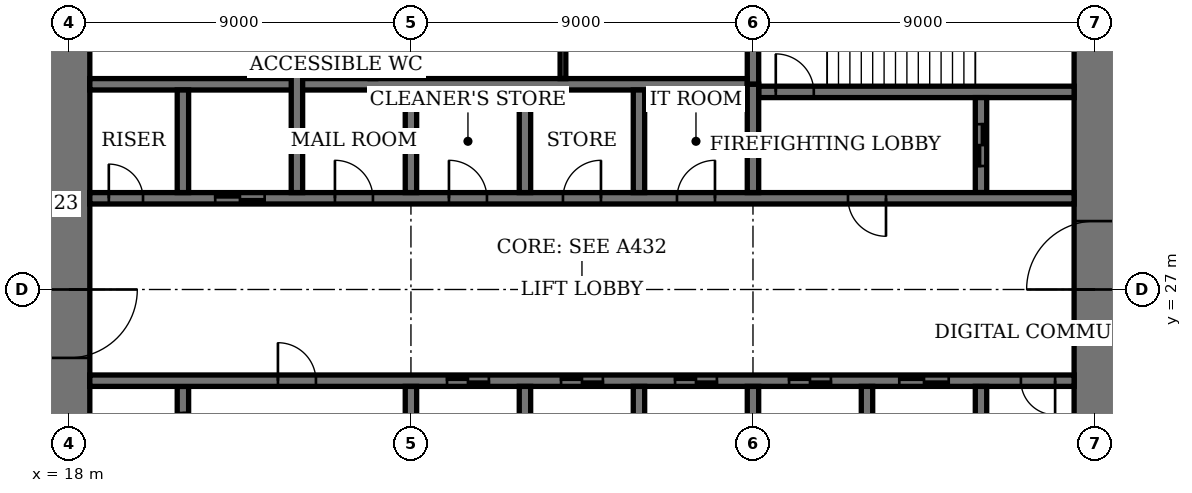
"""IFC4 building model, lengths in metres.
Left out: names, types, materials, properties, quantities, classifications, styles, units other than length and angle.
Written with IfcOpenShell. Run it as: python <this file> out.ifc"""

import sys

from ifc_helpers import new_model, si_unit, direction, frame, frame_2d, origin, place, context, subcontext, project, spatial, rectangle, extrude, element, fill, save


model = new_model("IFC4")
c1 = context("Model", 3, precision=1e-05, world=origin(), true_north=direction((0.0, 1.0)))
c2 = subcontext(c1, "Body", "Model", "MODEL_VIEW")
j1 = project(units=[si_unit("LENGTHUNIT", "METRE"), si_unit("PLANEANGLEUNIT", "RADIAN")], contexts=[c1])
p1 = place(None, origin())
s1 = spatial("IfcSite", under=j1, at=p1, CompositionType="ELEMENT")
p2 = place(p1, origin())
s2 = spatial("IfcBuilding", under=s1, at=p2, CompositionType="ELEMENT")
p3 = place(p2, frame((0.0, 0.0, 271.4)))
s3 = spatial("IfcBuildingStorey", under=s2, at=p3, CompositionType="ELEMENT", Elevation=271.4)
p4 = place(p3, frame((18.0, 35.45, 0.0), z_axis=(0.0, 0.0, 1.0), x_axis=(0.0, -1.0, 0.0)))
e1 = element("IfcWall", 1, at=p4, inside=s3, PredefinedType="SHEAR", context=c2, shape_type="SweptSolid", body=[
    extrude(rectangle(XDim=16.9, YDim=1.1, at=frame_2d((8.45, 0.0))), origin(), (0.0, 0.0, 1.0), 4.0),
])
p5 = place(p4, frame((8.45, 0.0, 0.0)))
e2 = element("IfcOpeningElement", 2, at=p5, cuts=e1, PredefinedType="OPENING", context=c2, shape_type="SweptSolid", body=[
    extrude(rectangle(XDim=1.8, YDim=2.4, at=frame_2d((0.9, 1.2))), frame((0.0, 0.56, 0.0), z_axis=(0.0, -1.0, 0.0), x_axis=(1.0, 0.0, 0.0)), (0.0, 0.0, 1.0), 1.12),
])
p6 = place(p3, frame((45.0, 18.55, 0.0), z_axis=(0.0, 0.0, 1.0), x_axis=(0.0, 1.0, 0.0)))
e3 = element("IfcWall", 3, at=p6, inside=s3, PredefinedType="SHEAR", context=c2, shape_type="SweptSolid", body=[
    extrude(rectangle(XDim=16.9, YDim=1.1, at=frame_2d((8.45, 0.0))), origin(), (0.0, 0.0, 1.0), 4.0),
])
p7 = place(p6, frame((8.45, 0.0, 0.0)))
e4 = element("IfcOpeningElement", 4, at=p7, cuts=e3, PredefinedType="OPENING", context=c2, shape_type="SweptSolid", body=[
    extrude(rectangle(XDim=1.8, YDim=2.4, at=frame_2d((0.9, 1.2))), frame((0.0, 0.56, 0.0), z_axis=(0.0, -1.0, 0.0), x_axis=(1.0, 0.0, 0.0)), (0.0, 0.0, 1.0), 1.12),
])
p8 = place(p3, frame((36.15, 32.2, 0.0), z_axis=(0.0, 0.0, 1.0), x_axis=(1.0, 0.0, 0.0)))
e5 = element("IfcWall", 5, at=p8, inside=s3, PredefinedType="SHEAR", context=c2, shape_type="SweptSolid", body=[
    extrude(rectangle(XDim=8.3, YDim=0.3, at=frame_2d((4.15, 0.0))), origin(), (0.0, 0.0, 1.0), 4.0),
])
p9 = place(p8, frame((0.45, 0.0, 0.0)))
e6 = element("IfcOpeningElement", 6, at=p9, cuts=e5, PredefinedType="OPENING", context=c2, shape_type="SweptSolid", body=[
    extrude(rectangle(XDim=1.0, YDim=2.4, at=frame_2d((0.5, 1.2))), frame((0.0, 0.16, 0.0), z_axis=(0.0, -1.0, 0.0), x_axis=(1.0, 0.0, 0.0)), (0.0, 0.0, 1.0), 0.32),
])
p10 = place(p3, frame((36.0, 32.4, 0.0), z_axis=(0.0, 0.0, 1.0), x_axis=(0.0, 1.0, 0.0)))
e7 = element("IfcWall", 7, at=p10, inside=s3, PredefinedType="SHEAR", context=c2, shape_type="SweptSolid", body=[
    extrude(rectangle(XDim=3.05, YDim=0.3, at=frame_2d((1.525, 0.0))), origin(), (0.0, 0.0, 1.0), 4.0),
])
p11 = place(p3, frame((21.0, 21.95, 0.0), z_axis=(0.0, 0.0, 1.0), x_axis=(0.0, 1.0, 0.0)))
e8 = element("IfcWall", 8, at=p11, inside=s3, PredefinedType="SHEAR", context=c2, shape_type="SweptSolid", body=[
    extrude(rectangle(XDim=2.5, YDim=0.3, at=frame_2d((1.25, 0.0))), origin(), (0.0, 0.0, 1.0), 4.0),
])
p12 = place(p11, frame((0.7, 0.0, 0.0)))
e9 = element("IfcOpeningElement", 9, at=p12, cuts=e8, PredefinedType="OPENING", context=c2, shape_type="SweptSolid", body=[
    extrude(rectangle(XDim=1.1, YDim=2.4, at=frame_2d((0.55, 1.2))), frame((0.0, 0.16, 0.0), z_axis=(0.0, -1.0, 0.0), x_axis=(1.0, 0.0, 0.0)), (0.0, 0.0, 1.0), 0.32),
])
p13 = place(p3, frame((42.0, 29.55, 0.0), z_axis=(0.0, 0.0, 1.0), x_axis=(0.0, 1.0, 0.0)))
e10 = element("IfcWall", 10, at=p13, inside=s3, PredefinedType="SHEAR", context=c2, shape_type="SweptSolid", body=[
    extrude(rectangle(XDim=2.5, YDim=0.3, at=frame_2d((1.25, 0.0))), origin(), (0.0, 0.0, 1.0), 4.0),
])
p14 = place(p13, frame((0.7, 0.0, 0.0)))
e11 = element("IfcOpeningElement", 11, at=p14, cuts=e10, PredefinedType="OPENING", context=c2, shape_type="SweptSolid", body=[
    extrude(rectangle(XDim=1.1, YDim=2.4, at=frame_2d((0.55, 1.2))), frame((0.0, 0.16, 0.0), z_axis=(0.0, -1.0, 0.0), x_axis=(1.0, 0.0, 0.0)), (0.0, 0.0, 1.0), 0.32),
])
p15 = place(p3, frame((18.55, 24.6, 0.0), z_axis=(0.0, 0.0, 1.0), x_axis=(1.0, 0.0, 0.0)))
e12 = element("IfcWall", 12, at=p15, inside=s3, PredefinedType="SHEAR", context=c2, shape_type="SweptSolid", body=[
    extrude(rectangle(XDim=25.9, YDim=0.3, at=frame_2d((12.95, 0.0))), origin(), (0.0, 0.0, 1.0), 4.0),
])
p16 = place(p15, frame((4.95, 0.0, 0.0)))
e13 = element("IfcOpeningElement", 13, at=p16, cuts=e12, PredefinedType="OPENING", context=c2, shape_type="SweptSolid", body=[
    extrude(rectangle(XDim=1.0, YDim=2.4, at=frame_2d((0.5, 1.2))), frame((0.0, 0.16, 0.0), z_axis=(0.0, -1.0, 0.0), x_axis=(1.0, 0.0, 0.0)), (0.0, 0.0, 1.0), 0.32),
])
p17 = place(p15, frame((24.5, 0.0, 0.0)))
e14 = element("IfcOpeningElement", 14, at=p17, cuts=e12, PredefinedType="OPENING", context=c2, shape_type="SweptSolid", body=[
    extrude(rectangle(XDim=0.9, YDim=2.1, at=frame_2d((0.45, 1.05))), frame((0.0, 0.16, 0.0), z_axis=(0.0, -1.0, 0.0), x_axis=(1.0, 0.0, 0.0)), (0.0, 0.0, 1.0), 0.32),
])
p18 = place(p15, frame((9.4, 0.0, 0.0)))
e15 = element("IfcOpeningElement", 15, at=p18, cuts=e12, PredefinedType="OPENING", context=c2, shape_type="SweptSolid", body=[
    extrude(rectangle(XDim=1.1, YDim=2.4, at=frame_2d((0.55, 1.2))), frame((0.0, 0.16, 0.0), z_axis=(0.0, -1.0, 0.0), x_axis=(1.0, 0.0, 0.0)), (0.0, 0.0, 1.0), 0.32),
])
p19 = place(p15, frame((12.4, 0.0, 0.0)))
e16 = element("IfcOpeningElement", 16, at=p19, cuts=e12, PredefinedType="OPENING", context=c2, shape_type="SweptSolid", body=[
    extrude(rectangle(XDim=1.1, YDim=2.4, at=frame_2d((0.55, 1.2))), frame((0.0, 0.16, 0.0), z_axis=(0.0, -1.0, 0.0), x_axis=(1.0, 0.0, 0.0)), (0.0, 0.0, 1.0), 0.32),
])
p20 = place(p15, frame((15.4, 0.0, 0.0)))
e17 = element("IfcOpeningElement", 17, at=p20, cuts=e12, PredefinedType="OPENING", context=c2, shape_type="SweptSolid", body=[
    extrude(rectangle(XDim=1.1, YDim=2.4, at=frame_2d((0.55, 1.2))), frame((0.0, 0.16, 0.0), z_axis=(0.0, -1.0, 0.0), x_axis=(1.0, 0.0, 0.0)), (0.0, 0.0, 1.0), 0.32),
])
p21 = place(p15, frame((18.4, 0.0, 0.0)))
e18 = element("IfcOpeningElement", 18, at=p21, cuts=e12, PredefinedType="OPENING", context=c2, shape_type="SweptSolid", body=[
    extrude(rectangle(XDim=1.1, YDim=2.4, at=frame_2d((0.55, 1.2))), frame((0.0, 0.16, 0.0), z_axis=(0.0, -1.0, 0.0), x_axis=(1.0, 0.0, 0.0)), (0.0, 0.0, 1.0), 0.32),
])
p22 = place(p15, frame((21.3, 0.0, 0.0)))
e19 = element("IfcOpeningElement", 19, at=p22, cuts=e12, PredefinedType="OPENING", context=c2, shape_type="SweptSolid", body=[
    extrude(rectangle(XDim=1.3, YDim=2.4, at=frame_2d((0.65, 1.2))), frame((0.0, 0.16, 0.0), z_axis=(0.0, -1.0, 0.0), x_axis=(1.0, 0.0, 0.0)), (0.0, 0.0, 1.0), 0.32),
])
p23 = place(p3, frame((18.55, 29.4, 0.0), z_axis=(0.0, 0.0, 1.0), x_axis=(1.0, 0.0, 0.0)))
e20 = element("IfcWall", 20, at=p23, inside=s3, PredefinedType="SHEAR", context=c2, shape_type="SweptSolid", body=[
    extrude(rectangle(XDim=25.9, YDim=0.3, at=frame_2d((12.95, 0.0))), origin(), (0.0, 0.0, 1.0), 4.0),
])
p24 = place(p23, frame((19.95, 0.0, 0.0)))
e21 = element("IfcOpeningElement", 21, at=p24, cuts=e20, PredefinedType="OPENING", context=c2, shape_type="SweptSolid", body=[
    extrude(rectangle(XDim=1.0, YDim=2.4, at=frame_2d((0.5, 1.2))), frame((0.0, 0.16, 0.0), z_axis=(0.0, -1.0, 0.0), x_axis=(1.0, 0.0, 0.0)), (0.0, 0.0, 1.0), 0.32),
])
p25 = place(p23, frame((0.5, 0.0, 0.0)))
e22 = element("IfcOpeningElement", 22, at=p25, cuts=e20, PredefinedType="OPENING", context=c2, shape_type="SweptSolid", body=[
    extrude(rectangle(XDim=0.9, YDim=2.1, at=frame_2d((0.45, 1.05))), frame((0.0, 0.16, 0.0), z_axis=(0.0, -1.0, 0.0), x_axis=(1.0, 0.0, 0.0)), (0.0, 0.0, 1.0), 0.32),
])
p26 = place(p23, frame((15.45, 0.0, 0.0)))
e23 = element("IfcOpeningElement", 23, at=p26, cuts=e20, PredefinedType="OPENING", context=c2, shape_type="SweptSolid", body=[
    extrude(rectangle(XDim=1.0, YDim=2.4, at=frame_2d((0.5, 1.2))), frame((0.0, 0.16, 0.0), z_axis=(0.0, -1.0, 0.0), x_axis=(1.0, 0.0, 0.0)), (0.0, 0.0, 1.0), 0.32),
])
p27 = place(p23, frame((12.45, 0.0, 0.0)))
e24 = element("IfcOpeningElement", 24, at=p27, cuts=e20, PredefinedType="OPENING", context=c2, shape_type="SweptSolid", body=[
    extrude(rectangle(XDim=1.0, YDim=2.4, at=frame_2d((0.5, 1.2))), frame((0.0, 0.16, 0.0), z_axis=(0.0, -1.0, 0.0), x_axis=(1.0, 0.0, 0.0)), (0.0, 0.0, 1.0), 0.32),
])
p28 = place(p23, frame((9.45, 0.0, 0.0)))
e25 = element("IfcOpeningElement", 25, at=p28, cuts=e20, PredefinedType="OPENING", context=c2, shape_type="SweptSolid", body=[
    extrude(rectangle(XDim=1.0, YDim=2.4, at=frame_2d((0.5, 1.2))), frame((0.0, 0.16, 0.0), z_axis=(0.0, -1.0, 0.0), x_axis=(1.0, 0.0, 0.0)), (0.0, 0.0, 1.0), 0.32),
])
p29 = place(p23, frame((6.45, 0.0, 0.0)))
e26 = element("IfcOpeningElement", 26, at=p29, cuts=e20, PredefinedType="OPENING", context=c2, shape_type="SweptSolid", body=[
    extrude(rectangle(XDim=1.0, YDim=2.4, at=frame_2d((0.5, 1.2))), frame((0.0, 0.16, 0.0), z_axis=(0.0, -1.0, 0.0), x_axis=(1.0, 0.0, 0.0)), (0.0, 0.0, 1.0), 0.32),
])
p30 = place(p23, frame((3.3, 0.0, 0.0)))
e27 = element("IfcOpeningElement", 27, at=p30, cuts=e20, PredefinedType="OPENING", context=c2, shape_type="SweptSolid", body=[
    extrude(rectangle(XDim=1.3, YDim=2.4, at=frame_2d((0.65, 1.2))), frame((0.0, 0.16, 0.0), z_axis=(0.0, -1.0, 0.0), x_axis=(1.0, 0.0, 0.0)), (0.0, 0.0, 1.0), 0.32),
])
p31 = place(p3, frame((18.55, 32.4, 0.0), z_axis=(0.0, 0.0, 1.0), x_axis=(1.0, 0.0, 0.0)))
e28 = element("IfcWall", 28, at=p31, inside=s3, PredefinedType="SHEAR", context=c2, shape_type="SweptSolid", body=[
    extrude(rectangle(XDim=17.3, YDim=0.3, at=frame_2d((8.65, 0.0))), origin(), (0.0, 0.0, 1.0), 4.0),
])
for number, where, z_axis, x_axis in (
    (29, (30.0, 21.75, 0.0), (0.0, 0.0, 1.0), (0.0, 1.0, 0.0)),
    (30, (33.0, 29.55, 0.0), (0.0, 0.0, 1.0), (0.0, 1.0, 0.0)),
    (31, (33.0, 21.75, 0.0), (0.0, 0.0, 1.0), (0.0, 1.0, 0.0)),
    (32, (30.0, 29.55, 0.0), (0.0, 0.0, 1.0), (0.0, 1.0, 0.0)),
    (33, (36.0, 21.75, 0.0), (0.0, 0.0, 1.0), (0.0, 1.0, 0.0)),
    (34, (27.0, 29.55, 0.0), (0.0, 0.0, 1.0), (0.0, 1.0, 0.0)),
):
    element("IfcWall", number, at=place(p3, frame(where, z_axis=z_axis, x_axis=x_axis)), inside=s3, PredefinedType="SHEAR", context=c2, shape_type="SweptSolid", body=[
        extrude(rectangle(XDim=2.7, YDim=0.3, at=frame_2d((1.35, 0.0))), origin(), (0.0, 0.0, 1.0), 4.0),
    ])
for number, where, z_axis, x_axis in (
    (35, (39.0, 18.55, 0.0), (0.0, 0.0, 1.0), (0.0, 1.0, 0.0)),
    (36, (24.0, 29.55, 0.0), (0.0, 0.0, 1.0), (0.0, 1.0, 0.0)),
):
    element("IfcWall", number, at=place(p3, frame(where, z_axis=z_axis, x_axis=x_axis)), inside=s3, PredefinedType="SHEAR", context=c2, shape_type="SweptSolid", body=[
        extrude(rectangle(XDim=5.9, YDim=0.3, at=frame_2d((2.95, 0.0))), origin(), (0.0, 0.0, 1.0), 4.0),
    ])
for number, where, z_axis, x_axis in (
    (37, (42.0, 21.75, 0.0), (0.0, 0.0, 1.0), (0.0, 1.0, 0.0)),
    (38, (21.0, 29.55, 0.0), (0.0, 0.0, 1.0), (0.0, 1.0, 0.0)),
):
    element("IfcWall", number, at=place(p3, frame(where, z_axis=z_axis, x_axis=x_axis)), inside=s3, PredefinedType="SHEAR", context=c2, shape_type="SweptSolid", body=[
        extrude(rectangle(XDim=2.7, YDim=0.3, at=frame_2d((1.35, 0.0))), origin(), (0.0, 0.0, 1.0), 4.0),
    ])
for number, where, z_axis, x_axis in (
    (39, (27.0, 21.6, 0.0), (0.0, 0.0, 1.0), (0.0, 1.0, 0.0)),
    (40, (36.0, 29.55, 0.0), (0.0, 0.0, 1.0), (0.0, 1.0, 0.0)),
):
    element("IfcWall", number, at=place(p3, frame(where, z_axis=z_axis, x_axis=x_axis)), inside=s3, PredefinedType="SHEAR", context=c2, shape_type="SweptSolid", body=[
        extrude(rectangle(XDim=2.85, YDim=0.3, at=frame_2d((1.425, 0.0))), origin(), (0.0, 0.0, 1.0), 4.0),
    ])
for number, where, z_axis, x_axis in (
    (41, (31.0, 32.55, 0.0), (0.0, 0.0, 1.0), (0.0, 1.0, 0.0)),
    (42, (26.0, 32.55, 0.0), (0.0, 0.0, 1.0), (0.0, 1.0, 0.0)),
):
    element("IfcWall", number, at=place(p3, frame(where, z_axis=z_axis, x_axis=x_axis)), inside=s3, PredefinedType="PARTITIONING", context=c2, shape_type="SweptSolid", body=[
        extrude(rectangle(XDim=2.9, YDim=0.15, at=frame_2d((1.45, 0.0))), origin(), (0.0, 0.0, 1.0), 3.75),
    ])
p32 = place(p5, origin())
e43 = element("IfcDoor", 43, at=p32, inside=s3, OperationType="DOUBLE_DOOR_DOUBLE_SWING", PredefinedType="DOOR", context=c2, shape_type="SweptSolid", body=[
    extrude(rectangle(XDim=1.8, YDim=2.4, at=frame_2d((0.9, 1.2))), frame((0.0, 0.03, 0.0), z_axis=(0.0, -1.0, 0.0), x_axis=(1.0, 0.0, 0.0)), (0.0, 0.0, 1.0), 0.06),
    extrude(rectangle(XDim=0.04, YDim=2.4, at=frame_2d((0.02, 1.2))), frame((0.0, 0.55, 0.0), z_axis=(0.0, -1.0, 0.0), x_axis=(1.0, 0.0, 0.0)), (0.0, 0.0, 1.0), 1.1),
    extrude(rectangle(XDim=0.04, YDim=2.4, at=frame_2d((1.78, 1.2))), frame((0.0, 0.55, 0.0), z_axis=(0.0, -1.0, 0.0), x_axis=(1.0, 0.0, 0.0)), (0.0, 0.0, 1.0), 1.1),
    extrude(rectangle(XDim=1.8, YDim=0.04, at=frame_2d((0.9, 2.38))), frame((0.0, 0.55, 0.0), z_axis=(0.0, -1.0, 0.0), x_axis=(1.0, 0.0, 0.0)), (0.0, 0.0, 1.0), 1.1),
])
fill(e2, e43)
p33 = place(p7, origin())
e44 = element("IfcDoor", 44, at=p33, inside=s3, OperationType="DOUBLE_DOOR_DOUBLE_SWING", PredefinedType="DOOR", context=c2, shape_type="SweptSolid", body=[
    extrude(rectangle(XDim=1.8, YDim=2.4, at=frame_2d((0.9, 1.2))), frame((0.0, 0.03, 0.0), z_axis=(0.0, -1.0, 0.0), x_axis=(1.0, 0.0, 0.0)), (0.0, 0.0, 1.0), 0.06),
    extrude(rectangle(XDim=0.04, YDim=2.4, at=frame_2d((0.02, 1.2))), frame((0.0, 0.55, 0.0), z_axis=(0.0, -1.0, 0.0), x_axis=(1.0, 0.0, 0.0)), (0.0, 0.0, 1.0), 1.1),
    extrude(rectangle(XDim=0.04, YDim=2.4, at=frame_2d((1.78, 1.2))), frame((0.0, 0.55, 0.0), z_axis=(0.0, -1.0, 0.0), x_axis=(1.0, 0.0, 0.0)), (0.0, 0.0, 1.0), 1.1),
    extrude(rectangle(XDim=1.8, YDim=0.04, at=frame_2d((0.9, 2.38))), frame((0.0, 0.55, 0.0), z_axis=(0.0, -1.0, 0.0), x_axis=(1.0, 0.0, 0.0)), (0.0, 0.0, 1.0), 1.1),
])
fill(e4, e44)
p34 = place(p9, origin())
e45 = element("IfcDoor", 45, at=p34, inside=s3, OperationType="SINGLE_SWING_RIGHT", PredefinedType="DOOR", context=c2, shape_type="SweptSolid", body=[
    extrude(rectangle(XDim=1.0, YDim=2.4, at=frame_2d((0.5, 1.2))), frame((0.0, 0.03, 0.0), z_axis=(0.0, -1.0, 0.0), x_axis=(1.0, 0.0, 0.0)), (0.0, 0.0, 1.0), 0.06),
])
fill(e6, e45)
p35 = place(p16, origin())
e46 = element("IfcDoor", 46, at=p35, inside=s3, OperationType="SINGLE_SWING_RIGHT", PredefinedType="DOOR", context=c2, shape_type="SweptSolid", body=[
    extrude(rectangle(XDim=1.0, YDim=2.4, at=frame_2d((0.5, 1.2))), frame((0.0, 0.03, 0.0), z_axis=(0.0, -1.0, 0.0), x_axis=(1.0, 0.0, 0.0)), (0.0, 0.0, 1.0), 0.06),
])
fill(e13, e46)
p36 = place(p24, origin())
e47 = element("IfcDoor", 47, at=p36, inside=s3, OperationType="SINGLE_SWING_RIGHT", PredefinedType="DOOR", context=c2, shape_type="SweptSolid", body=[
    extrude(rectangle(XDim=1.0, YDim=2.4, at=frame_2d((0.5, 1.2))), frame((0.0, 0.03, 0.0), z_axis=(0.0, -1.0, 0.0), x_axis=(1.0, 0.0, 0.0)), (0.0, 0.0, 1.0), 0.06),
])
fill(e21, e47)
p37 = place(p17, origin())
e48 = element("IfcDoor", 48, at=p37, inside=s3, OperationType="SINGLE_SWING_RIGHT", PredefinedType="DOOR", context=c2, shape_type="SweptSolid", body=[
    extrude(rectangle(XDim=0.9, YDim=2.1, at=frame_2d((0.45, 1.05))), frame((0.0, 0.03, 0.0), z_axis=(0.0, -1.0, 0.0), x_axis=(1.0, 0.0, 0.0)), (0.0, 0.0, 1.0), 0.06),
])
fill(e14, e48)
p38 = place(p25, origin())
e49 = element("IfcDoor", 49, at=p38, inside=s3, OperationType="SINGLE_SWING_RIGHT", PredefinedType="DOOR", context=c2, shape_type="SweptSolid", body=[
    extrude(rectangle(XDim=0.9, YDim=2.1, at=frame_2d((0.45, 1.05))), frame((0.0, 0.03, 0.0), z_axis=(0.0, -1.0, 0.0), x_axis=(1.0, 0.0, 0.0)), (0.0, 0.0, 1.0), 0.06),
])
fill(e22, e49)
p39 = place(p18, origin())
e50 = element("IfcDoor", 50, at=p39, inside=s3, OperationType="DOUBLE_DOOR_SLIDING", PredefinedType="DOOR", context=c2, shape_type="SweptSolid", body=[
    extrude(rectangle(XDim=1.1, YDim=2.4, at=frame_2d((0.55, 1.2))), frame((0.0, 0.02, 0.0), z_axis=(0.0, -1.0, 0.0), x_axis=(1.0, 0.0, 0.0)), (0.0, 0.0, 1.0), 0.04),
])
fill(e15, e50)
p40 = place(p19, origin())
e51 = element("IfcDoor", 51, at=p40, inside=s3, OperationType="DOUBLE_DOOR_SLIDING", PredefinedType="DOOR", context=c2, shape_type="SweptSolid", body=[
    extrude(rectangle(XDim=1.1, YDim=2.4, at=frame_2d((0.55, 1.2))), frame((0.0, 0.02, 0.0), z_axis=(0.0, -1.0, 0.0), x_axis=(1.0, 0.0, 0.0)), (0.0, 0.0, 1.0), 0.04),
])
fill(e16, e51)
p41 = place(p20, origin())
e52 = element("IfcDoor", 52, at=p41, inside=s3, OperationType="DOUBLE_DOOR_SLIDING", PredefinedType="DOOR", context=c2, shape_type="SweptSolid", body=[
    extrude(rectangle(XDim=1.1, YDim=2.4, at=frame_2d((0.55, 1.2))), frame((0.0, 0.02, 0.0), z_axis=(0.0, -1.0, 0.0), x_axis=(1.0, 0.0, 0.0)), (0.0, 0.0, 1.0), 0.04),
])
fill(e17, e52)
p42 = place(p21, origin())
e53 = element("IfcDoor", 53, at=p42, inside=s3, OperationType="DOUBLE_DOOR_SLIDING", PredefinedType="DOOR", context=c2, shape_type="SweptSolid", body=[
    extrude(rectangle(XDim=1.1, YDim=2.4, at=frame_2d((0.55, 1.2))), frame((0.0, 0.02, 0.0), z_axis=(0.0, -1.0, 0.0), x_axis=(1.0, 0.0, 0.0)), (0.0, 0.0, 1.0), 0.04),
])
fill(e18, e53)
p43 = place(p26, origin())
e54 = element("IfcDoor", 54, at=p43, inside=s3, OperationType="SINGLE_SWING_LEFT", PredefinedType="DOOR", context=c2, shape_type="SweptSolid", body=[
    extrude(rectangle(XDim=1.0, YDim=2.4, at=frame_2d((0.5, 1.2))), frame((0.0, 0.03, 0.0), z_axis=(0.0, -1.0, 0.0), x_axis=(1.0, 0.0, 0.0)), (0.0, 0.0, 1.0), 0.06),
])
fill(e23, e54)
p44 = place(p27, origin())
e55 = element("IfcDoor", 55, at=p44, inside=s3, OperationType="SINGLE_SWING_LEFT", PredefinedType="DOOR", context=c2, shape_type="SweptSolid", body=[
    extrude(rectangle(XDim=1.0, YDim=2.4, at=frame_2d((0.5, 1.2))), frame((0.0, 0.03, 0.0), z_axis=(0.0, -1.0, 0.0), x_axis=(1.0, 0.0, 0.0)), (0.0, 0.0, 1.0), 0.06),
])
fill(e24, e55)
p45 = place(p28, origin())
e56 = element("IfcDoor", 56, at=p45, inside=s3, OperationType="SINGLE_SWING_RIGHT", PredefinedType="DOOR", context=c2, shape_type="SweptSolid", body=[
    extrude(rectangle(XDim=1.0, YDim=2.4, at=frame_2d((0.5, 1.2))), frame((0.0, 0.03, 0.0), z_axis=(0.0, -1.0, 0.0), x_axis=(1.0, 0.0, 0.0)), (0.0, 0.0, 1.0), 0.06),
])
fill(e25, e56)
p46 = place(p29, origin())
e57 = element("IfcDoor", 57, at=p46, inside=s3, OperationType="SINGLE_SWING_RIGHT", PredefinedType="DOOR", context=c2, shape_type="SweptSolid", body=[
    extrude(rectangle(XDim=1.0, YDim=2.4, at=frame_2d((0.5, 1.2))), frame((0.0, 0.03, 0.0), z_axis=(0.0, -1.0, 0.0), x_axis=(1.0, 0.0, 0.0)), (0.0, 0.0, 1.0), 0.06),
])
fill(e26, e57)
p47 = place(p22, origin())
e58 = element("IfcDoor", 58, at=p47, inside=s3, OperationType="DOUBLE_DOOR_SLIDING", PredefinedType="DOOR", context=c2, shape_type="SweptSolid", body=[
    extrude(rectangle(XDim=1.3, YDim=2.4, at=frame_2d((0.65, 1.2))), frame((0.0, 0.02, 0.0), z_axis=(0.0, -1.0, 0.0), x_axis=(1.0, 0.0, 0.0)), (0.0, 0.0, 1.0), 0.04),
])
fill(e19, e58)
p48 = place(p30, origin())
e59 = element("IfcDoor", 59, at=p48, inside=s3, OperationType="DOUBLE_DOOR_SLIDING", PredefinedType="DOOR", context=c2, shape_type="SweptSolid", body=[
    extrude(rectangle(XDim=1.3, YDim=2.4, at=frame_2d((0.65, 1.2))), frame((0.0, 0.02, 0.0), z_axis=(0.0, -1.0, 0.0), x_axis=(1.0, 0.0, 0.0)), (0.0, 0.0, 1.0), 0.04),
])
fill(e27, e59)
p49 = place(p14, origin())
e60 = element("IfcDoor", 60, at=p49, inside=s3, OperationType="DOUBLE_DOOR_SLIDING", PredefinedType="DOOR", context=c2, shape_type="SweptSolid", body=[
    extrude(rectangle(XDim=1.1, YDim=2.4, at=frame_2d((0.55, 1.2))), frame((0.0, 0.03, 0.0), z_axis=(0.0, -1.0, 0.0), x_axis=(1.0, 0.0, 0.0)), (0.0, 0.0, 1.0), 0.06),
])
fill(e11, e60)
save(model, sys.argv[1])
